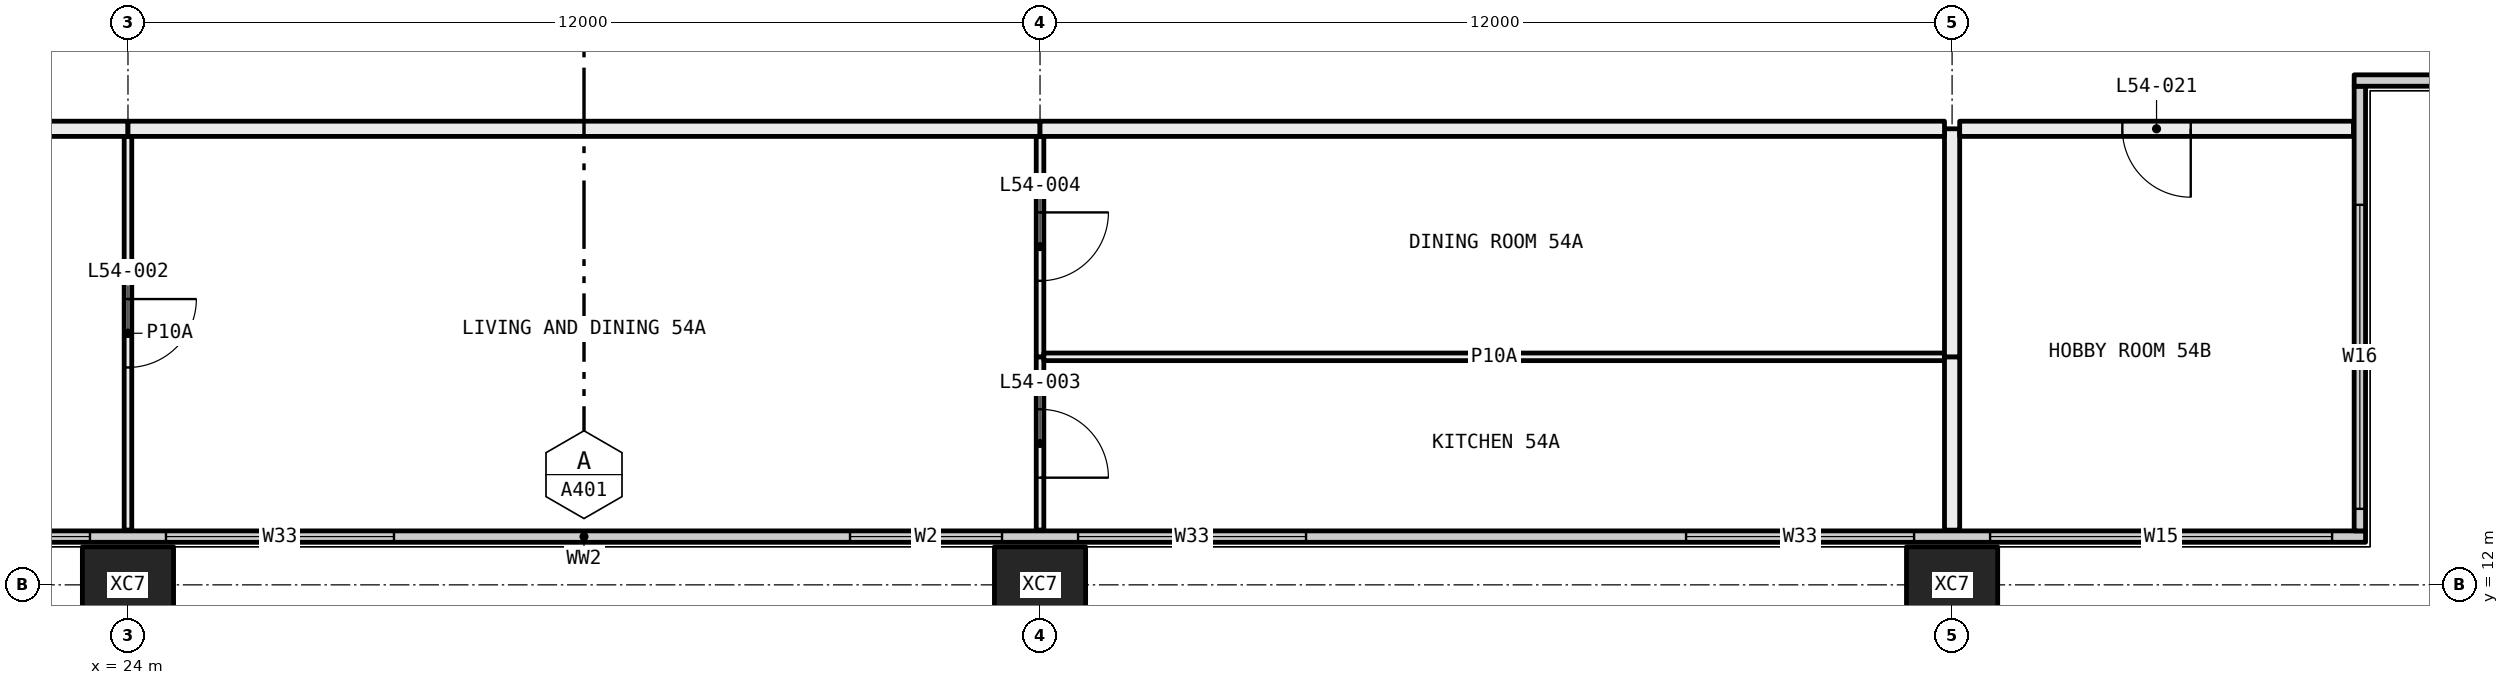
"""IFC4 building model, lengths in metres.
Left out: names, types, materials, properties, quantities, classifications, styles, units other than length and angle.
Written with IfcOpenShell. Run it as: python <this file> out.ifc"""

import sys

from ifc_helpers import new_model, si_unit, direction, frame, frame_2d, origin, origin_2d, place, context, subcontext, project, spatial, rectangle, hollow_rectangle, extrude, element, fill, save


model = new_model("IFC4")
c1 = context("Model", 3, precision=1e-05, world=origin(), true_north=direction((0.0, 1.0)))
c2 = subcontext(c1, "Body", "Model", "MODEL_VIEW")
j1 = project(units=[si_unit("LENGTHUNIT", "METRE"), si_unit("PLANEANGLEUNIT", "RADIAN")], contexts=[c1])
p1 = place(None, origin())
s1 = spatial("IfcSite", under=j1, at=p1, CompositionType="ELEMENT")
p2 = place(p1, origin())
s2 = spatial("IfcBuilding", under=s1, at=p2, CompositionType="ELEMENT")
p3 = place(p2, frame((0.0, 0.0, 203.1)))
s3 = spatial("IfcBuildingStorey", under=s2, at=p3, CompositionType="ELEMENT", Elevation=203.1)
for number, where, z_axis, x_axis in (
    (1, (24.0, 12.0, -0.4), (0.0, 0.0, 1.0), (1.0, 0.0, 0.0)),
    (2, (36.0, 12.0, -0.4), (0.0, 0.0, 1.0), (1.0, 0.0, 0.0)),
    (3, (48.0, 12.0, -0.4), (0.0, 0.0, 1.0), (1.0, 0.0, 0.0)),
):
    element("IfcColumn", number, at=place(p3, frame(where, z_axis=z_axis, x_axis=x_axis)), inside=s3, PredefinedType="COLUMN", context=c2, shape_type="SweptSolid", body=[
        extrude(hollow_rectangle(XDim=1.2, YDim=1.0, WallThickness=0.045, at=origin_2d()), origin(), (0.0, 0.0, 1.0), 3.45),
    ])
p4 = place(p3, frame((6.56, 12.635, 0.0), z_axis=(0.0, 0.0, 1.0), x_axis=(1.0, 0.0, 0.0)))
e4 = element("IfcWall", 4, at=p4, inside=s3, PredefinedType="ELEMENTEDWALL", context=c2, shape_type="SweptSolid", body=[
    extrude(rectangle(XDim=46.88, YDim=0.15, at=frame_2d((23.44, 0.0))), origin(), (0.0, 0.0, 1.0), 3.05),
])
p5 = place(p4, frame((0.44, 0.0, 0.45)))
e5 = element("IfcOpeningElement", 5, at=p5, cuts=e4, PredefinedType="OPENING", context=c2, shape_type="SweptSolid", body=[
    extrude(rectangle(XDim=4.5, YDim=2.55, at=frame_2d((2.25, 1.275))), frame((0.0, 0.085, 0.0), z_axis=(0.0, -1.0, 0.0), x_axis=(1.0, 0.0, 0.0)), (0.0, 0.0, 1.0), 0.17),
])
p6 = place(p4, frame((5.94, 0.0, 0.45)))
e6 = element("IfcOpeningElement", 6, at=p6, cuts=e4, PredefinedType="OPENING", context=c2, shape_type="SweptSolid", body=[
    extrude(rectangle(XDim=3.0, YDim=2.55, at=frame_2d((1.5, 1.275))), frame((0.0, 0.085, 0.0), z_axis=(0.0, -1.0, 0.0), x_axis=(1.0, 0.0, 0.0)), (0.0, 0.0, 1.0), 0.17),
])
p7 = place(p4, frame((13.94, 0.0, 0.45)))
e7 = element("IfcOpeningElement", 7, at=p7, cuts=e4, PredefinedType="OPENING", context=c2, shape_type="SweptSolid", body=[
    extrude(rectangle(XDim=3.0, YDim=2.55, at=frame_2d((1.5, 1.275))), frame((0.0, 0.085, 0.0), z_axis=(0.0, -1.0, 0.0), x_axis=(1.0, 0.0, 0.0)), (0.0, 0.0, 1.0), 0.17),
])
p8 = place(p4, frame((17.94, 0.0, 0.45)))
e8 = element("IfcOpeningElement", 8, at=p8, cuts=e4, PredefinedType="OPENING", context=c2, shape_type="SweptSolid", body=[
    extrude(rectangle(XDim=3.0, YDim=2.55, at=frame_2d((1.5, 1.275))), frame((0.0, 0.085, 0.0), z_axis=(0.0, -1.0, 0.0), x_axis=(1.0, 0.0, 0.0)), (0.0, 0.0, 1.0), 0.17),
])
p9 = place(p4, frame((26.94, 0.0, 0.45)))
e9 = element("IfcOpeningElement", 9, at=p9, cuts=e4, PredefinedType="OPENING", context=c2, shape_type="SweptSolid", body=[
    extrude(rectangle(XDim=2.0, YDim=2.55, at=frame_2d((1.0, 1.275))), frame((0.0, 0.085, 0.0), z_axis=(0.0, -1.0, 0.0), x_axis=(1.0, 0.0, 0.0)), (0.0, 0.0, 1.0), 0.17),
])
p10 = place(p4, frame((29.94, 0.0, 0.45)))
e10 = element("IfcOpeningElement", 10, at=p10, cuts=e4, PredefinedType="OPENING", context=c2, shape_type="SweptSolid", body=[
    extrude(rectangle(XDim=3.0, YDim=2.55, at=frame_2d((1.5, 1.275))), frame((0.0, 0.085, 0.0), z_axis=(0.0, -1.0, 0.0), x_axis=(1.0, 0.0, 0.0)), (0.0, 0.0, 1.0), 0.17),
])
p11 = place(p4, frame((37.94, 0.0, 0.45)))
e11 = element("IfcOpeningElement", 11, at=p11, cuts=e4, PredefinedType="OPENING", context=c2, shape_type="SweptSolid", body=[
    extrude(rectangle(XDim=3.0, YDim=2.55, at=frame_2d((1.5, 1.275))), frame((0.0, 0.085, 0.0), z_axis=(0.0, -1.0, 0.0), x_axis=(1.0, 0.0, 0.0)), (0.0, 0.0, 1.0), 0.17),
])
p12 = place(p4, frame((41.94, 0.0, 0.45)))
e12 = element("IfcOpeningElement", 12, at=p12, cuts=e4, PredefinedType="OPENING", context=c2, shape_type="SweptSolid", body=[
    extrude(rectangle(XDim=4.5, YDim=2.55, at=frame_2d((2.25, 1.275))), frame((0.0, 0.085, 0.0), z_axis=(0.0, -1.0, 0.0), x_axis=(1.0, 0.0, 0.0)), (0.0, 0.0, 1.0), 0.17),
])
p13 = place(p3, frame((53.365, 12.71, 0.0), z_axis=(0.0, 0.0, 1.0), x_axis=(0.0, 1.0, 0.0)))
e13 = element("IfcWall", 13, at=p13, inside=s3, PredefinedType="ELEMENTEDWALL", context=c2, shape_type="SweptSolid", body=[
    extrude(rectangle(XDim=5.85, YDim=0.15, at=frame_2d((2.925, 0.0))), origin(), (0.0, 0.0, 1.0), 3.05),
])
p14 = place(p13, frame((0.29, 0.0, 0.45)))
e14 = element("IfcOpeningElement", 14, at=p14, cuts=e13, PredefinedType="OPENING", context=c2, shape_type="SweptSolid", body=[
    extrude(rectangle(XDim=4.0, YDim=2.55, at=frame_2d((2.0, 1.275))), frame((0.0, 0.085, 0.0), z_axis=(0.0, -1.0, 0.0), x_axis=(1.0, 0.0, 0.0)), (0.0, 0.0, 1.0), 0.17),
])
p15 = place(p3, frame((53.29, 18.635, 0.0), z_axis=(0.0, 0.0, 1.0), x_axis=(1.0, 0.0, 0.0)))
e15 = element("IfcWall", 15, at=p15, inside=s3, PredefinedType="ELEMENTEDWALL", context=c2, shape_type="SweptSolid", body=[
    extrude(rectangle(XDim=6.15, YDim=0.15, at=frame_2d((3.075, 0.0))), origin(), (0.0, 0.0, 1.0), 3.05),
])
p16 = place(p15, frame((1.71, 0.0, 0.45)))
e16 = element("IfcOpeningElement", 16, at=p16, cuts=e15, PredefinedType="OPENING", context=c2, shape_type="SweptSolid", body=[
    extrude(rectangle(XDim=4.0, YDim=2.55, at=frame_2d((2.0, 1.275))), frame((0.0, 0.085, 0.0), z_axis=(0.0, -1.0, 0.0), x_axis=(1.0, 0.0, 0.0)), (0.0, 0.0, 1.0), 0.17),
])
p17 = place(p3, frame((24.0, 12.72, 0.0), z_axis=(0.0, 0.0, 1.0), x_axis=(0.0, 1.0, 0.0)))
e17 = element("IfcWall", 17, at=p17, inside=s3, PredefinedType="PARTITIONING", context=c2, shape_type="SweptSolid", body=[
    extrude(rectangle(XDim=5.18, YDim=0.1, at=frame_2d((2.59, 0.0))), origin(), (0.0, 0.0, 1.0), 3.05),
])
p18 = place(p17, frame((2.14, 0.0, 0.0)))
e18 = element("IfcOpeningElement", 18, at=p18, cuts=e17, PredefinedType="OPENING", context=c2, shape_type="SweptSolid", body=[
    extrude(rectangle(XDim=0.9, YDim=2.1, at=frame_2d((0.45, 1.05))), frame((0.0, 0.06, 0.0), z_axis=(0.0, -1.0, 0.0), x_axis=(1.0, 0.0, 0.0)), (0.0, 0.0, 1.0), 0.12),
])
p19 = place(p3, frame((24.0, 18.0, 0.0), z_axis=(0.0, 0.0, 1.0), x_axis=(-1.0, 0.0, 0.0)))
e19 = element("IfcWall", 19, at=p19, inside=s3, PredefinedType="PARTITIONING", context=c2, shape_type="SweptSolid", body=[
    extrude(rectangle(XDim=6.0, YDim=0.2, at=frame_2d((3.0, 0.0))), origin(), (0.0, 0.0, 1.0), 3.05),
])
p20 = place(p19, frame((2.5, 0.0, 0.0)))
e20 = element("IfcOpeningElement", 20, at=p20, cuts=e19, PredefinedType="OPENING", context=c2, shape_type="SweptSolid", body=[
    extrude(rectangle(XDim=1.0, YDim=2.1, at=frame_2d((0.5, 1.05))), frame((0.0, 0.11, 0.0), z_axis=(0.0, -1.0, 0.0), x_axis=(1.0, 0.0, 0.0)), (0.0, 0.0, 1.0), 0.22),
])
p21 = place(p3, frame((36.0, 12.72, 0.0), z_axis=(0.0, 0.0, 1.0), x_axis=(0.0, 1.0, 0.0)))
e21 = element("IfcWall", 21, at=p21, inside=s3, PredefinedType="PARTITIONING", context=c2, shape_type="SweptSolid", body=[
    extrude(rectangle(XDim=2.28, YDim=0.1, at=frame_2d((1.14, 0.0))), origin(), (0.0, 0.0, 1.0), 2.45),
])
p22 = place(p21, frame((0.69, 0.0, 0.0)))
e22 = element("IfcOpeningElement", 22, at=p22, cuts=e21, PredefinedType="OPENING", context=c2, shape_type="SweptSolid", body=[
    extrude(rectangle(XDim=0.9, YDim=2.1, at=frame_2d((0.45, 1.05))), frame((0.0, 0.06, 0.0), z_axis=(0.0, -1.0, 0.0), x_axis=(1.0, 0.0, 0.0)), (0.0, 0.0, 1.0), 0.12),
])
p23 = place(p3, frame((36.0, 15.0, 0.0), z_axis=(0.0, 0.0, 1.0), x_axis=(0.0, 1.0, 0.0)))
e23 = element("IfcWall", 23, at=p23, inside=s3, PredefinedType="PARTITIONING", context=c2, shape_type="SweptSolid", body=[
    extrude(rectangle(XDim=2.9, YDim=0.1, at=frame_2d((1.45, 0.0))), origin(), (0.0, 0.0, 1.0), 2.45),
])
p24 = place(p23, frame((1.0, 0.0, 0.0)))
e24 = element("IfcOpeningElement", 24, at=p24, cuts=e23, PredefinedType="OPENING", context=c2, shape_type="SweptSolid", body=[
    extrude(rectangle(XDim=0.9, YDim=2.1, at=frame_2d((0.45, 1.05))), frame((0.0, 0.06, 0.0), z_axis=(0.0, -1.0, 0.0), x_axis=(1.0, 0.0, 0.0)), (0.0, 0.0, 1.0), 0.12),
])
p25 = place(p3, frame((36.0, 18.0, 0.0), z_axis=(0.0, 0.0, 1.0), x_axis=(-1.0, 0.0, 0.0)))
e25 = element("IfcWall", 25, at=p25, inside=s3, PredefinedType="PARTITIONING", context=c2, shape_type="SweptSolid", body=[
    extrude(rectangle(XDim=12.0, YDim=0.2, at=frame_2d((6.0, 0.0))), origin(), (0.0, 0.0, 1.0), 2.45),
])
p26 = place(p3, frame((47.9, 15.0, 0.0), z_axis=(0.0, 0.0, 1.0), x_axis=(-1.0, 0.0, 0.0)))
e26 = element("IfcWall", 26, at=p26, inside=s3, PredefinedType="PARTITIONING", context=c2, shape_type="SweptSolid", body=[
    extrude(rectangle(XDim=11.85, YDim=0.1, at=frame_2d((5.925, 0.0))), origin(), (0.0, 0.0, 1.0), 2.45),
])
p27 = place(p3, frame((48.0, 12.72, 0.0), z_axis=(0.0, 0.0, 1.0), x_axis=(0.0, 1.0, 0.0)))
e27 = element("IfcWall", 27, at=p27, inside=s3, PredefinedType="PARTITIONING", context=c2, shape_type="SweptSolid", body=[
    extrude(rectangle(XDim=2.28, YDim=0.2, at=frame_2d((1.14, 0.0))), origin(), (0.0, 0.0, 1.0), 3.05),
])
p28 = place(p3, frame((48.0, 15.0, 0.0), z_axis=(0.0, 0.0, 1.0), x_axis=(0.0, 1.0, 0.0)))
e28 = element("IfcWall", 28, at=p28, inside=s3, PredefinedType="PARTITIONING", context=c2, shape_type="SweptSolid", body=[
    extrude(rectangle(XDim=3.0, YDim=0.2, at=frame_2d((1.5, 0.0))), origin(), (0.0, 0.0, 1.0), 3.05),
])
p29 = place(p3, frame((47.9, 18.0, 0.0), z_axis=(0.0, 0.0, 1.0), x_axis=(-1.0, 0.0, 0.0)))
e29 = element("IfcWall", 29, at=p29, inside=s3, PredefinedType="PARTITIONING", context=c2, shape_type="SweptSolid", body=[
    extrude(rectangle(XDim=11.9, YDim=0.2, at=frame_2d((5.95, 0.0))), origin(), (0.0, 0.0, 1.0), 2.45),
])
p30 = place(p3, frame((53.28, 18.0, 0.0), z_axis=(0.0, 0.0, 1.0), x_axis=(-1.0, 0.0, 0.0)))
e30 = element("IfcWall", 30, at=p30, inside=s3, PredefinedType="PARTITIONING", context=c2, shape_type="SweptSolid", body=[
    extrude(rectangle(XDim=5.18, YDim=0.2, at=frame_2d((2.59, 0.0))), origin(), (0.0, 0.0, 1.0), 3.05),
])
p31 = place(p30, frame((2.14, 0.0, 0.0)))
e31 = element("IfcOpeningElement", 31, at=p31, cuts=e30, PredefinedType="OPENING", context=c2, shape_type="SweptSolid", body=[
    extrude(rectangle(XDim=0.9, YDim=2.1, at=frame_2d((0.45, 1.05))), frame((0.0, 0.11, 0.0), z_axis=(0.0, -1.0, 0.0), x_axis=(1.0, 0.0, 0.0)), (0.0, 0.0, 1.0), 0.22),
])
p32 = place(p7, origin())
e32 = element("IfcWindow", 32, at=p32, inside=s3, PartitioningType="SINGLE_PANEL", PredefinedType="WINDOW", context=c2, shape_type="SweptSolid", body=[
    extrude(rectangle(XDim=3.0, YDim=2.55, at=frame_2d((1.5, 1.275))), frame((0.0, 0.03, 0.0), z_axis=(0.0, -1.0, 0.0), x_axis=(1.0, 0.0, 0.0)), (0.0, 0.0, 1.0), 0.06),
])
fill(e7, e32)
p33 = place(p8, origin())
e33 = element("IfcWindow", 33, at=p33, inside=s3, PartitioningType="SINGLE_PANEL", PredefinedType="WINDOW", context=c2, shape_type="SweptSolid", body=[
    extrude(rectangle(XDim=3.0, YDim=2.55, at=frame_2d((1.5, 1.275))), frame((0.0, 0.03, 0.0), z_axis=(0.0, -1.0, 0.0), x_axis=(1.0, 0.0, 0.0)), (0.0, 0.0, 1.0), 0.06),
])
fill(e8, e33)
p34 = place(p9, origin())
e34 = element("IfcWindow", 34, at=p34, inside=s3, PartitioningType="SINGLE_PANEL", PredefinedType="WINDOW", context=c2, shape_type="SweptSolid", body=[
    extrude(rectangle(XDim=2.0, YDim=2.55, at=frame_2d((1.0, 1.275))), frame((0.0, 0.03, 0.0), z_axis=(0.0, -1.0, 0.0), x_axis=(1.0, 0.0, 0.0)), (0.0, 0.0, 1.0), 0.06),
])
fill(e9, e34)
p35 = place(p10, origin())
e35 = element("IfcWindow", 35, at=p35, inside=s3, PartitioningType="SINGLE_PANEL", PredefinedType="WINDOW", context=c2, shape_type="SweptSolid", body=[
    extrude(rectangle(XDim=3.0, YDim=2.55, at=frame_2d((1.5, 1.275))), frame((0.0, 0.03, 0.0), z_axis=(0.0, -1.0, 0.0), x_axis=(1.0, 0.0, 0.0)), (0.0, 0.0, 1.0), 0.06),
])
fill(e10, e35)
p36 = place(p11, origin())
e36 = element("IfcWindow", 36, at=p36, inside=s3, PartitioningType="SINGLE_PANEL", PredefinedType="WINDOW", context=c2, shape_type="SweptSolid", body=[
    extrude(rectangle(XDim=3.0, YDim=2.55, at=frame_2d((1.5, 1.275))), frame((0.0, 0.03, 0.0), z_axis=(0.0, -1.0, 0.0), x_axis=(1.0, 0.0, 0.0)), (0.0, 0.0, 1.0), 0.06),
])
fill(e11, e36)
p37 = place(p12, origin())
e37 = element("IfcWindow", 37, at=p37, inside=s3, PartitioningType="SINGLE_PANEL", PredefinedType="WINDOW", context=c2, shape_type="SweptSolid", body=[
    extrude(rectangle(XDim=4.5, YDim=2.55, at=frame_2d((2.25, 1.275))), frame((0.0, 0.03, 0.0), z_axis=(0.0, -1.0, 0.0), x_axis=(1.0, 0.0, 0.0)), (0.0, 0.0, 1.0), 0.06),
])
fill(e12, e37)
p38 = place(p14, origin())
e38 = element("IfcWindow", 38, at=p38, inside=s3, PartitioningType="SINGLE_PANEL", PredefinedType="WINDOW", context=c2, shape_type="SweptSolid", body=[
    extrude(rectangle(XDim=4.0, YDim=2.55, at=frame_2d((2.0, 1.275))), frame((0.0, 0.03, 0.0), z_axis=(0.0, -1.0, 0.0), x_axis=(1.0, 0.0, 0.0)), (0.0, 0.0, 1.0), 0.06),
])
fill(e14, e38)
p39 = place(p18, frame((0.9, 0.0, 0.0), x_axis=(-1.0, 0.0, 0.0)))
e39 = element("IfcDoor", 39, at=p39, inside=s3, OperationType="SINGLE_SWING_RIGHT", PredefinedType="DOOR", context=c2, shape_type="SweptSolid", body=[
    extrude(rectangle(XDim=0.9, YDim=2.1, at=frame_2d((0.45, 1.05))), frame((0.0, 0.025, 0.0), z_axis=(0.0, -1.0, 0.0), x_axis=(1.0, 0.0, 0.0)), (0.0, 0.0, 1.0), 0.05),
])
fill(e18, e39)
p40 = place(p22, frame((0.9, 0.0, 0.0), x_axis=(-1.0, 0.0, 0.0)))
e40 = element("IfcDoor", 40, at=p40, inside=s3, OperationType="SINGLE_SWING_LEFT", PredefinedType="DOOR", context=c2, shape_type="SweptSolid", body=[
    extrude(rectangle(XDim=0.9, YDim=2.1, at=frame_2d((0.45, 1.05))), frame((0.0, 0.025, 0.0), z_axis=(0.0, -1.0, 0.0), x_axis=(1.0, 0.0, 0.0)), (0.0, 0.0, 1.0), 0.05),
])
fill(e22, e40)
p41 = place(p24, frame((0.9, 0.0, 0.0), x_axis=(-1.0, 0.0, 0.0)))
e41 = element("IfcDoor", 41, at=p41, inside=s3, OperationType="SINGLE_SWING_RIGHT", PredefinedType="DOOR", context=c2, shape_type="SweptSolid", body=[
    extrude(rectangle(XDim=0.9, YDim=2.1, at=frame_2d((0.45, 1.05))), frame((0.0, 0.025, 0.0), z_axis=(0.0, -1.0, 0.0), x_axis=(1.0, 0.0, 0.0)), (0.0, 0.0, 1.0), 0.05),
])
fill(e24, e41)
p42 = place(p31, origin())
e42 = element("IfcDoor", 42, at=p42, inside=s3, OperationType="SINGLE_SWING_RIGHT", PredefinedType="DOOR", context=c2, shape_type="SweptSolid", body=[
    extrude(rectangle(XDim=0.9, YDim=2.1, at=frame_2d((0.45, 1.05))), frame((0.0, 0.025, 0.0), z_axis=(0.0, -1.0, 0.0), x_axis=(1.0, 0.0, 0.0)), (0.0, 0.0, 1.0), 0.05),
])
fill(e31, e42)
save(model, sys.argv[1])
